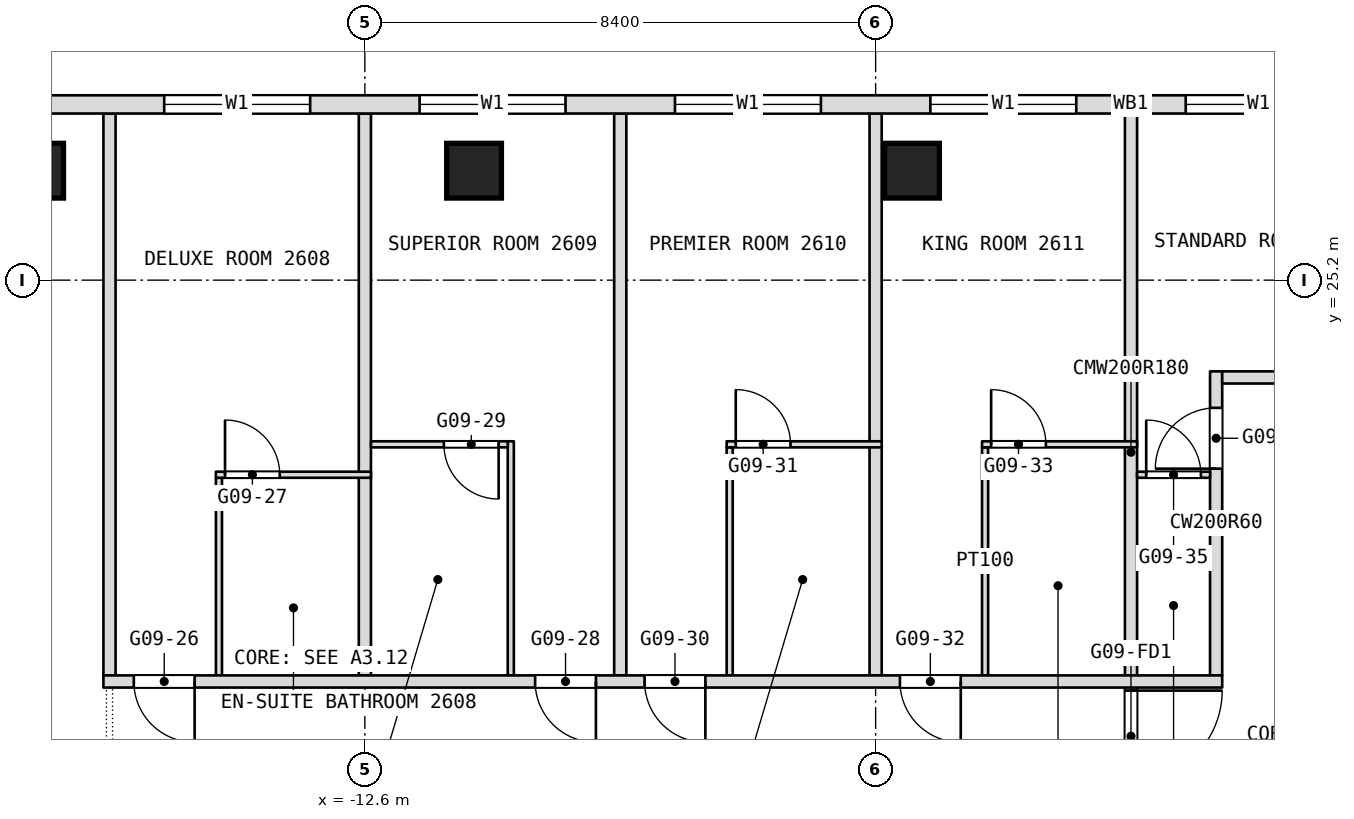
"""IFC4 building model, lengths in metres.
Left out: names, types, materials, properties, quantities, classifications, styles, units other than length and angle.
Written with IfcOpenShell. Run it as: python <this file> out.ifc"""

import sys

from ifc_helpers import new_model, si_unit, direction, frame, frame_2d, origin, origin_2d, place, context, subcontext, project, spatial, rectangle, extrude, element, fill, save


model = new_model("IFC4")
c1 = context("Model", 3, precision=1e-05, world=origin(), true_north=direction((0.0, 1.0)))
c2 = subcontext(c1, "Body", "Model", "MODEL_VIEW")
j1 = project(units=[si_unit("LENGTHUNIT", "METRE"), si_unit("PLANEANGLEUNIT", "RADIAN")], contexts=[c1])
p1 = place(None, origin())
s1 = spatial("IfcSite", under=j1, at=p1, CompositionType="ELEMENT")
p2 = place(p1, origin())
s2 = spatial("IfcBuilding", under=s1, at=p2, CompositionType="ELEMENT")
p3 = place(p2, frame((0.0, 0.0, 119.3)))
s3 = spatial("IfcBuildingStorey", under=s2, at=p3, CompositionType="ELEMENT", Elevation=119.3)
for number, where, z_axis, x_axis in (
    (1, (-18.007, 27.0, 0.0), (0.0, 0.0, 1.0), (1.0, 0.0, 0.0)),
    (2, (-10.804, 27.0, 0.0), (0.0, 0.0, 1.0), (1.0, 0.0, 0.0)),
    (3, (-3.601, 27.0, 0.0), (0.0, 0.0, 1.0), (1.0, 0.0, 0.0)),
):
    element("IfcColumn", number, at=place(p3, frame(where, z_axis=z_axis, x_axis=x_axis)), inside=s3, PredefinedType="COLUMN", context=c2, shape_type="SweptSolid", body=[
        extrude(rectangle(XDim=0.9, YDim=0.9, at=origin_2d()), origin(), (0.0, 0.0, 1.0), 3.6),
    ])
p4 = place(p3, frame((1.4, 18.7, 0.0), z_axis=(0.0, 0.0, 1.0), x_axis=(0.0, 1.0, 0.0)))
e4 = element("IfcWall", 4, at=p4, inside=s3, PredefinedType="PARTITIONING", context=c2, shape_type="SweptSolid", body=[
    extrude(rectangle(XDim=5.0, YDim=0.2, at=frame_2d((2.5, 0.0))), origin(), (0.0, 0.0, 1.0), 3.34),
])
p5 = place(p4, frame((3.4, 0.0, 0.0)))
e5 = element("IfcOpeningElement", 5, at=p5, cuts=e4, PredefinedType="OPENING", context=c2, shape_type="SweptSolid", body=[
    extrude(rectangle(XDim=1.0, YDim=2.1, at=frame_2d((0.5, 1.05))), frame((0.0, 0.1, 0.0), z_axis=(0.0, -1.0, 0.0), x_axis=(1.0, 0.0, 0.0)), (0.0, 0.0, 1.0), 0.2),
])
p6 = place(p3, frame((0.0, 16.8, 0.0), z_axis=(0.0, 0.0, 1.0), x_axis=(0.0, 1.0, 0.0)))
e6 = element("IfcWall", 6, at=p6, inside=s3, PredefinedType="PARTITIONING", context=c2, shape_type="SweptSolid", body=[
    extrude(rectangle(XDim=11.14, YDim=0.2, at=frame_2d((5.57, 0.0))), origin(), (0.0, 0.0, 1.0), 3.34),
])
p7 = place(p6, frame((0.15, 0.0, 0.0)))
e7 = element("IfcOpeningElement", 7, at=p7, cuts=e6, PredefinedType="OPENING", context=c2, shape_type="SweptSolid", body=[
    extrude(rectangle(XDim=1.5, YDim=2.1, at=frame_2d((0.75, 1.05))), frame((0.0, 0.1, 0.0), z_axis=(0.0, -1.0, 0.0), x_axis=(1.0, 0.0, 0.0)), (0.0, 0.0, 1.0), 0.2),
])
p8 = place(p3, frame((-2.4, 18.7, 0.0), z_axis=(0.0, 0.0, 1.0), x_axis=(0.0, 1.0, 0.0)))
e8 = element("IfcWall", 8, at=p8, inside=s3, PredefinedType="PARTITIONING", context=c2, shape_type="SweptSolid", body=[
    extrude(rectangle(XDim=3.75, YDim=0.1, at=frame_2d((1.875, 0.0))), origin(), (0.0, 0.0, 1.0), 3.34),
])
p9 = place(p3, frame((-4.2, 18.7, 0.0), z_axis=(0.0, 0.0, 1.0), x_axis=(0.0, 1.0, 0.0)))
e9 = element("IfcWall", 9, at=p9, inside=s3, PredefinedType="PARTITIONING", context=c2, shape_type="SweptSolid", body=[
    extrude(rectangle(XDim=9.24, YDim=0.2, at=frame_2d((4.62, 0.0))), origin(), (0.0, 0.0, 1.0), 3.34),
])
p10 = place(p3, frame((-6.6, 18.7, 0.0), z_axis=(0.0, 0.0, 1.0), x_axis=(0.0, 1.0, 0.0)))
e10 = element("IfcWall", 10, at=p10, inside=s3, PredefinedType="PARTITIONING", context=c2, shape_type="SweptSolid", body=[
    extrude(rectangle(XDim=3.75, YDim=0.1, at=frame_2d((1.875, 0.0))), origin(), (0.0, 0.0, 1.0), 3.34),
])
p11 = place(p3, frame((-8.4, 18.7, 0.0), z_axis=(0.0, 0.0, 1.0), x_axis=(0.0, 1.0, 0.0)))
e11 = element("IfcWall", 11, at=p11, inside=s3, PredefinedType="PARTITIONING", context=c2, shape_type="SweptSolid", body=[
    extrude(rectangle(XDim=9.24, YDim=0.2, at=frame_2d((4.62, 0.0))), origin(), (0.0, 0.0, 1.0), 3.34),
])
p12 = place(p3, frame((-10.2, 18.7, 0.0), z_axis=(0.0, 0.0, 1.0), x_axis=(0.0, 1.0, 0.0)))
e12 = element("IfcWall", 12, at=p12, inside=s3, PredefinedType="PARTITIONING", context=c2, shape_type="SweptSolid", body=[
    extrude(rectangle(XDim=3.85, YDim=0.1, at=frame_2d((1.925, 0.0))), origin(), (0.0, 0.0, 1.0), 3.34),
])
p13 = place(p3, frame((-12.6, 18.7, 0.0), z_axis=(0.0, 0.0, 1.0), x_axis=(0.0, 1.0, 0.0)))
e13 = element("IfcWall", 13, at=p13, inside=s3, PredefinedType="PARTITIONING", context=c2, shape_type="SweptSolid", body=[
    extrude(rectangle(XDim=9.24, YDim=0.2, at=frame_2d((4.62, 0.0))), origin(), (0.0, 0.0, 1.0), 3.34),
])
p14 = place(p3, frame((-15.0, 18.7, 0.0), z_axis=(0.0, 0.0, 1.0), x_axis=(0.0, 1.0, 0.0)))
e14 = element("IfcWall", 14, at=p14, inside=s3, PredefinedType="PARTITIONING", context=c2, shape_type="SweptSolid", body=[
    extrude(rectangle(XDim=3.25, YDim=0.1, at=frame_2d((1.625, 0.0))), origin(), (0.0, 0.0, 1.0), 3.34),
])
p15 = place(p3, frame((-16.8, 18.7, 0.0), z_axis=(0.0, 0.0, 1.0), x_axis=(0.0, 1.0, 0.0)))
e15 = element("IfcWall", 15, at=p15, inside=s3, PredefinedType="PARTITIONING", context=c2, shape_type="SweptSolid", body=[
    extrude(rectangle(XDim=9.24, YDim=0.2, at=frame_2d((4.62, 0.0))), origin(), (0.0, 0.0, 1.0), 3.34),
])
p16 = place(p3, frame((-16.9, 18.6, 0.0), z_axis=(0.0, 0.0, 1.0), x_axis=(1.0, 0.0, 0.0)))
e16 = element("IfcWall", 16, at=p16, inside=s3, PredefinedType="PARTITIONING", context=c2, shape_type="SweptSolid", body=[
    extrude(rectangle(XDim=18.4, YDim=0.2, at=frame_2d((9.2, 0.0))), origin(), (0.0, 0.0, 1.0), 3.34),
])
p17 = place(p16, frame((0.5, 0.0, 0.0)))
e17 = element("IfcOpeningElement", 17, at=p17, cuts=e16, PredefinedType="OPENING", context=c2, shape_type="SweptSolid", body=[
    extrude(rectangle(XDim=1.0, YDim=2.1, at=frame_2d((0.5, 1.05))), frame((0.0, 0.1, 0.0), z_axis=(0.0, -1.0, 0.0), x_axis=(1.0, 0.0, 0.0)), (0.0, 0.0, 1.0), 0.2),
])
p18 = place(p16, frame((7.1, 0.0, 0.0)))
e18 = element("IfcOpeningElement", 18, at=p18, cuts=e16, PredefinedType="OPENING", context=c2, shape_type="SweptSolid", body=[
    extrude(rectangle(XDim=1.0, YDim=2.1, at=frame_2d((0.5, 1.05))), frame((0.0, 0.1, 0.0), z_axis=(0.0, -1.0, 0.0), x_axis=(1.0, 0.0, 0.0)), (0.0, 0.0, 1.0), 0.2),
])
p19 = place(p16, frame((8.9, 0.0, 0.0)))
e19 = element("IfcOpeningElement", 19, at=p19, cuts=e16, PredefinedType="OPENING", context=c2, shape_type="SweptSolid", body=[
    extrude(rectangle(XDim=1.0, YDim=2.1, at=frame_2d((0.5, 1.05))), frame((0.0, 0.1, 0.0), z_axis=(0.0, -1.0, 0.0), x_axis=(1.0, 0.0, 0.0)), (0.0, 0.0, 1.0), 0.2),
])
p20 = place(p16, frame((13.1, 0.0, 0.0)))
e20 = element("IfcOpeningElement", 20, at=p20, cuts=e16, PredefinedType="OPENING", context=c2, shape_type="SweptSolid", body=[
    extrude(rectangle(XDim=1.0, YDim=2.1, at=frame_2d((0.5, 1.05))), frame((0.0, 0.1, 0.0), z_axis=(0.0, -1.0, 0.0), x_axis=(1.0, 0.0, 0.0)), (0.0, 0.0, 1.0), 0.2),
])
p21 = place(p3, frame((-15.05, 22.0, 0.0), z_axis=(0.0, 0.0, 1.0), x_axis=(1.0, 0.0, 0.0)))
e21 = element("IfcWall", 21, at=p21, inside=s3, PredefinedType="PARTITIONING", context=c2, shape_type="SweptSolid", body=[
    extrude(rectangle(XDim=2.55, YDim=0.1, at=frame_2d((1.275, 0.0))), origin(), (0.0, 0.0, 1.0), 3.34),
])
p22 = place(p21, frame((0.15, 0.0, 0.0)))
e22 = element("IfcOpeningElement", 22, at=p22, cuts=e21, PredefinedType="OPENING", context=c2, shape_type="SweptSolid", body=[
    extrude(rectangle(XDim=0.9, YDim=2.1, at=frame_2d((0.45, 1.05))), frame((0.0, 0.05, 0.0), z_axis=(0.0, -1.0, 0.0), x_axis=(1.0, 0.0, 0.0)), (0.0, 0.0, 1.0), 0.1),
])
p23 = place(p3, frame((0.1, 22.0, 0.0), z_axis=(0.0, 0.0, 1.0), x_axis=(1.0, 0.0, 0.0)))
e23 = element("IfcWall", 23, at=p23, inside=s3, PredefinedType="PARTITIONING", context=c2, shape_type="SweptSolid", body=[
    extrude(rectangle(XDim=1.2, YDim=0.1, at=frame_2d((0.6, 0.0))), origin(), (0.0, 0.0, 1.0), 3.34),
])
p24 = place(p23, frame((0.15, 0.0, 0.0)))
e24 = element("IfcOpeningElement", 24, at=p24, cuts=e23, PredefinedType="OPENING", context=c2, shape_type="SweptSolid", body=[
    extrude(rectangle(XDim=0.9, YDim=2.1, at=frame_2d((0.45, 1.05))), frame((0.0, 0.05, 0.0), z_axis=(0.0, -1.0, 0.0), x_axis=(1.0, 0.0, 0.0)), (0.0, 0.0, 1.0), 0.1),
])
p25 = place(p3, frame((-12.5, 22.5, 0.0), z_axis=(0.0, 0.0, 1.0), x_axis=(1.0, 0.0, 0.0)))
e25 = element("IfcWall", 25, at=p25, inside=s3, PredefinedType="PARTITIONING", context=c2, shape_type="SweptSolid", body=[
    extrude(rectangle(XDim=2.25, YDim=0.1, at=frame_2d((1.125, 0.0))), origin(), (0.0, 0.0, 1.0), 3.34),
])
p26 = place(p25, frame((1.2, 0.0, 0.0)))
e26 = element("IfcOpeningElement", 26, at=p26, cuts=e25, PredefinedType="OPENING", context=c2, shape_type="SweptSolid", body=[
    extrude(rectangle(XDim=0.9, YDim=2.1, at=frame_2d((0.45, 1.05))), frame((0.0, 0.05, 0.0), z_axis=(0.0, -1.0, 0.0), x_axis=(1.0, 0.0, 0.0)), (0.0, 0.0, 1.0), 0.1),
])
p27 = place(p3, frame((-6.65, 22.5, 0.0), z_axis=(0.0, 0.0, 1.0), x_axis=(1.0, 0.0, 0.0)))
e27 = element("IfcWall", 27, at=p27, inside=s3, PredefinedType="PARTITIONING", context=c2, shape_type="SweptSolid", body=[
    extrude(rectangle(XDim=2.55, YDim=0.1, at=frame_2d((1.275, 0.0))), origin(), (0.0, 0.0, 1.0), 3.34),
])
p28 = place(p27, frame((0.15, 0.0, 0.0)))
e28 = element("IfcOpeningElement", 28, at=p28, cuts=e27, PredefinedType="OPENING", context=c2, shape_type="SweptSolid", body=[
    extrude(rectangle(XDim=0.9, YDim=2.1, at=frame_2d((0.45, 1.05))), frame((0.0, 0.05, 0.0), z_axis=(0.0, -1.0, 0.0), x_axis=(1.0, 0.0, 0.0)), (0.0, 0.0, 1.0), 0.1),
])
p29 = place(p3, frame((-2.45, 22.5, 0.0), z_axis=(0.0, 0.0, 1.0), x_axis=(1.0, 0.0, 0.0)))
e29 = element("IfcWall", 29, at=p29, inside=s3, PredefinedType="PARTITIONING", context=c2, shape_type="SweptSolid", body=[
    extrude(rectangle(XDim=2.55, YDim=0.1, at=frame_2d((1.275, 0.0))), origin(), (0.0, 0.0, 1.0), 3.34),
])
p30 = place(p29, frame((0.15, 0.0, 0.0)))
e30 = element("IfcOpeningElement", 30, at=p30, cuts=e29, PredefinedType="OPENING", context=c2, shape_type="SweptSolid", body=[
    extrude(rectangle(XDim=0.9, YDim=2.1, at=frame_2d((0.45, 1.05))), frame((0.0, 0.05, 0.0), z_axis=(0.0, -1.0, 0.0), x_axis=(1.0, 0.0, 0.0)), (0.0, 0.0, 1.0), 0.1),
])
p31 = place(p3, frame((1.5, 23.6, 0.0), z_axis=(0.0, 0.0, 1.0), x_axis=(1.0, 0.0, 0.0)))
e31 = element("IfcWall", 31, at=p31, inside=s3, PredefinedType="PARTITIONING", context=c2, shape_type="SweptSolid", body=[
    extrude(rectangle(XDim=9.2, YDim=0.2, at=frame_2d((4.6, 0.0))), origin(), (0.0, 0.0, 1.0), 3.34),
])
p32 = place(p31, frame((4.3, 0.0, 0.0)))
e32 = element("IfcOpeningElement", 32, at=p32, cuts=e31, PredefinedType="OPENING", context=c2, shape_type="SweptSolid", body=[
    extrude(rectangle(XDim=1.0, YDim=2.1, at=frame_2d((0.5, 1.05))), frame((0.0, 0.1, 0.0), z_axis=(0.0, -1.0, 0.0), x_axis=(1.0, 0.0, 0.0)), (0.0, 0.0, 1.0), 0.2),
])
p33 = place(p3, frame((21.306, 28.09, 0.0), z_axis=(0.0, 0.0, 1.0), x_axis=(-1.0, 0.0, 0.0)))
e33 = element("IfcWall", 33, at=p33, inside=s3, PredefinedType="NOTDEFINED", context=c2, shape_type="SweptSolid", body=[
    extrude(rectangle(XDim=42.612, YDim=0.3, at=frame_2d((21.306, 0.0))), origin(), (0.0, 0.0, 1.0), 3.6),
])
p34 = place(p33, frame((5.406, 0.0, 0.9)))
e34 = element("IfcOpeningElement", 34, at=p34, cuts=e33, PredefinedType="OPENING", context=c2, shape_type="SweptSolid", body=[
    extrude(rectangle(XDim=2.4, YDim=2.1, at=frame_2d((1.2, 1.05))), frame((0.0, 0.15, 0.0), z_axis=(0.0, -1.0, 0.0), x_axis=(1.0, 0.0, 0.0)), (0.0, 0.0, 1.0), 0.3),
])
p35 = place(p33, frame((9.606, 0.0, 0.9)))
e35 = element("IfcOpeningElement", 35, at=p35, cuts=e33, PredefinedType="OPENING", context=c2, shape_type="SweptSolid", body=[
    extrude(rectangle(XDim=2.4, YDim=2.1, at=frame_2d((1.2, 1.05))), frame((0.0, 0.15, 0.0), z_axis=(0.0, -1.0, 0.0), x_axis=(1.0, 0.0, 0.0)), (0.0, 0.0, 1.0), 0.3),
])
p36 = place(p33, frame((13.806, 0.0, 0.9)))
e36 = element("IfcOpeningElement", 36, at=p36, cuts=e33, PredefinedType="OPENING", context=c2, shape_type="SweptSolid", body=[
    extrude(rectangle(XDim=2.4, YDim=2.1, at=frame_2d((1.2, 1.05))), frame((0.0, 0.15, 0.0), z_axis=(0.0, -1.0, 0.0), x_axis=(1.0, 0.0, 0.0)), (0.0, 0.0, 1.0), 0.3),
])
p37 = place(p33, frame((18.006, 0.0, 0.9)))
e37 = element("IfcOpeningElement", 37, at=p37, cuts=e33, PredefinedType="OPENING", context=c2, shape_type="SweptSolid", body=[
    extrude(rectangle(XDim=2.4, YDim=2.1, at=frame_2d((1.2, 1.05))), frame((0.0, 0.15, 0.0), z_axis=(0.0, -1.0, 0.0), x_axis=(1.0, 0.0, 0.0)), (0.0, 0.0, 1.0), 0.3),
])
p38 = place(p33, frame((22.206, 0.0, 0.9)))
e38 = element("IfcOpeningElement", 38, at=p38, cuts=e33, PredefinedType="OPENING", context=c2, shape_type="SweptSolid", body=[
    extrude(rectangle(XDim=2.4, YDim=2.1, at=frame_2d((1.2, 1.05))), frame((0.0, 0.15, 0.0), z_axis=(0.0, -1.0, 0.0), x_axis=(1.0, 0.0, 0.0)), (0.0, 0.0, 1.0), 0.3),
])
p39 = place(p33, frame((26.406, 0.0, 0.9)))
e39 = element("IfcOpeningElement", 39, at=p39, cuts=e33, PredefinedType="OPENING", context=c2, shape_type="SweptSolid", body=[
    extrude(rectangle(XDim=2.4, YDim=2.1, at=frame_2d((1.2, 1.05))), frame((0.0, 0.15, 0.0), z_axis=(0.0, -1.0, 0.0), x_axis=(1.0, 0.0, 0.0)), (0.0, 0.0, 1.0), 0.3),
])
p40 = place(p33, frame((30.606, 0.0, 0.9)))
e40 = element("IfcOpeningElement", 40, at=p40, cuts=e33, PredefinedType="OPENING", context=c2, shape_type="SweptSolid", body=[
    extrude(rectangle(XDim=2.4, YDim=2.1, at=frame_2d((1.2, 1.05))), frame((0.0, 0.15, 0.0), z_axis=(0.0, -1.0, 0.0), x_axis=(1.0, 0.0, 0.0)), (0.0, 0.0, 1.0), 0.3),
])
p41 = place(p33, frame((34.806, 0.0, 0.9)))
e41 = element("IfcOpeningElement", 41, at=p41, cuts=e33, PredefinedType="OPENING", context=c2, shape_type="SweptSolid", body=[
    extrude(rectangle(XDim=2.4, YDim=2.1, at=frame_2d((1.2, 1.05))), frame((0.0, 0.15, 0.0), z_axis=(0.0, -1.0, 0.0), x_axis=(1.0, 0.0, 0.0)), (0.0, 0.0, 1.0), 0.3),
])
p42 = place(p5, origin())
e42 = element("IfcDoor", 42, at=p42, inside=s3, OperationType="SINGLE_SWING_RIGHT", PredefinedType="DOOR", context=c2, shape_type="SweptSolid", body=[
    extrude(rectangle(XDim=1.0, YDim=2.1, at=frame_2d((0.5, 1.05))), frame((0.0, 0.025, 0.0), z_axis=(0.0, -1.0, 0.0), x_axis=(1.0, 0.0, 0.0)), (0.0, 0.0, 1.0), 0.05),
])
fill(e5, e42)
p43 = place(p17, origin())
e43 = element("IfcDoor", 43, at=p43, inside=s3, OperationType="SINGLE_SWING_LEFT", PredefinedType="DOOR", context=c2, shape_type="SweptSolid", body=[
    extrude(rectangle(XDim=1.0, YDim=2.1, at=frame_2d((0.5, 1.05))), frame((0.0, 0.025, 0.0), z_axis=(0.0, -1.0, 0.0), x_axis=(1.0, 0.0, 0.0)), (0.0, 0.0, 1.0), 0.05),
])
fill(e17, e43)
p44 = place(p18, origin())
e44 = element("IfcDoor", 44, at=p44, inside=s3, OperationType="SINGLE_SWING_LEFT", PredefinedType="DOOR", context=c2, shape_type="SweptSolid", body=[
    extrude(rectangle(XDim=1.0, YDim=2.1, at=frame_2d((0.5, 1.05))), frame((0.0, 0.025, 0.0), z_axis=(0.0, -1.0, 0.0), x_axis=(1.0, 0.0, 0.0)), (0.0, 0.0, 1.0), 0.05),
])
fill(e18, e44)
p45 = place(p19, origin())
e45 = element("IfcDoor", 45, at=p45, inside=s3, OperationType="SINGLE_SWING_LEFT", PredefinedType="DOOR", context=c2, shape_type="SweptSolid", body=[
    extrude(rectangle(XDim=1.0, YDim=2.1, at=frame_2d((0.5, 1.05))), frame((0.0, 0.025, 0.0), z_axis=(0.0, -1.0, 0.0), x_axis=(1.0, 0.0, 0.0)), (0.0, 0.0, 1.0), 0.05),
])
fill(e19, e45)
p46 = place(p20, origin())
e46 = element("IfcDoor", 46, at=p46, inside=s3, OperationType="SINGLE_SWING_LEFT", PredefinedType="DOOR", context=c2, shape_type="SweptSolid", body=[
    extrude(rectangle(XDim=1.0, YDim=2.1, at=frame_2d((0.5, 1.05))), frame((0.0, 0.025, 0.0), z_axis=(0.0, -1.0, 0.0), x_axis=(1.0, 0.0, 0.0)), (0.0, 0.0, 1.0), 0.05),
])
fill(e20, e46)
p47 = place(p22, origin())
e47 = element("IfcDoor", 47, at=p47, inside=s3, OperationType="SINGLE_SWING_RIGHT", PredefinedType="DOOR", context=c2, shape_type="SweptSolid", body=[
    extrude(rectangle(XDim=0.9, YDim=2.1, at=frame_2d((0.45, 1.05))), frame((0.0, 0.025, 0.0), z_axis=(0.0, -1.0, 0.0), x_axis=(1.0, 0.0, 0.0)), (0.0, 0.0, 1.0), 0.05),
])
fill(e22, e47)
p48 = place(p24, origin())
e48 = element("IfcDoor", 48, at=p48, inside=s3, OperationType="SINGLE_SWING_LEFT", PredefinedType="DOOR", context=c2, shape_type="SweptSolid", body=[
    extrude(rectangle(XDim=0.9, YDim=2.1, at=frame_2d((0.45, 1.05))), frame((0.0, 0.025, 0.0), z_axis=(0.0, -1.0, 0.0), x_axis=(1.0, 0.0, 0.0)), (0.0, 0.0, 1.0), 0.05),
])
fill(e24, e48)
p49 = place(p26, origin())
e49 = element("IfcDoor", 49, at=p49, inside=s3, OperationType="SINGLE_SWING_LEFT", PredefinedType="DOOR", context=c2, shape_type="SweptSolid", body=[
    extrude(rectangle(XDim=0.9, YDim=2.1, at=frame_2d((0.45, 1.05))), frame((0.0, 0.025, 0.0), z_axis=(0.0, -1.0, 0.0), x_axis=(1.0, 0.0, 0.0)), (0.0, 0.0, 1.0), 0.05),
])
fill(e26, e49)
p50 = place(p28, origin())
e50 = element("IfcDoor", 50, at=p50, inside=s3, OperationType="SINGLE_SWING_RIGHT", PredefinedType="DOOR", context=c2, shape_type="SweptSolid", body=[
    extrude(rectangle(XDim=0.9, YDim=2.1, at=frame_2d((0.45, 1.05))), frame((0.0, 0.025, 0.0), z_axis=(0.0, -1.0, 0.0), x_axis=(1.0, 0.0, 0.0)), (0.0, 0.0, 1.0), 0.05),
])
fill(e28, e50)
p51 = place(p30, origin())
e51 = element("IfcDoor", 51, at=p51, inside=s3, OperationType="SINGLE_SWING_RIGHT", PredefinedType="DOOR", context=c2, shape_type="SweptSolid", body=[
    extrude(rectangle(XDim=0.9, YDim=2.1, at=frame_2d((0.45, 1.05))), frame((0.0, 0.025, 0.0), z_axis=(0.0, -1.0, 0.0), x_axis=(1.0, 0.0, 0.0)), (0.0, 0.0, 1.0), 0.05),
])
fill(e30, e51)
p52 = place(p37, origin())
e52 = element("IfcWindow", 52, at=p52, inside=s3, PartitioningType="SINGLE_PANEL", PredefinedType="WINDOW", context=c2, shape_type="SweptSolid", body=[
    extrude(rectangle(XDim=2.4, YDim=2.1, at=frame_2d((1.2, 1.05))), frame((0.0, 0.03, 0.0), z_axis=(0.0, -1.0, 0.0), x_axis=(1.0, 0.0, 0.0)), (0.0, 0.0, 1.0), 0.06),
])
fill(e37, e52)
p53 = place(p38, origin())
e53 = element("IfcWindow", 53, at=p53, inside=s3, PartitioningType="SINGLE_PANEL", PredefinedType="WINDOW", context=c2, shape_type="SweptSolid", body=[
    extrude(rectangle(XDim=2.4, YDim=2.1, at=frame_2d((1.2, 1.05))), frame((0.0, 0.03, 0.0), z_axis=(0.0, -1.0, 0.0), x_axis=(1.0, 0.0, 0.0)), (0.0, 0.0, 1.0), 0.06),
])
fill(e38, e53)
p54 = place(p39, origin())
e54 = element("IfcWindow", 54, at=p54, inside=s3, PartitioningType="SINGLE_PANEL", PredefinedType="WINDOW", context=c2, shape_type="SweptSolid", body=[
    extrude(rectangle(XDim=2.4, YDim=2.1, at=frame_2d((1.2, 1.05))), frame((0.0, 0.03, 0.0), z_axis=(0.0, -1.0, 0.0), x_axis=(1.0, 0.0, 0.0)), (0.0, 0.0, 1.0), 0.06),
])
fill(e39, e54)
p55 = place(p40, origin())
e55 = element("IfcWindow", 55, at=p55, inside=s3, PartitioningType="SINGLE_PANEL", PredefinedType="WINDOW", context=c2, shape_type="SweptSolid", body=[
    extrude(rectangle(XDim=2.4, YDim=2.1, at=frame_2d((1.2, 1.05))), frame((0.0, 0.03, 0.0), z_axis=(0.0, -1.0, 0.0), x_axis=(1.0, 0.0, 0.0)), (0.0, 0.0, 1.0), 0.06),
])
fill(e40, e55)
p56 = place(p41, origin())
e56 = element("IfcWindow", 56, at=p56, inside=s3, PartitioningType="SINGLE_PANEL", PredefinedType="WINDOW", context=c2, shape_type="SweptSolid", body=[
    extrude(rectangle(XDim=2.4, YDim=2.1, at=frame_2d((1.2, 1.05))), frame((0.0, 0.03, 0.0), z_axis=(0.0, -1.0, 0.0), x_axis=(1.0, 0.0, 0.0)), (0.0, 0.0, 1.0), 0.06),
])
fill(e41, e56)
p57 = place(p7, origin())
e57 = element("IfcDoor", 57, at=p57, inside=s3, OperationType="DOUBLE_DOOR_DOUBLE_SWING", PredefinedType="DOOR", context=c2, shape_type="SweptSolid", body=[
    extrude(rectangle(XDim=1.5, YDim=2.1, at=frame_2d((0.75, 1.05))), frame((0.0, 0.025, 0.0), z_axis=(0.0, -1.0, 0.0), x_axis=(1.0, 0.0, 0.0)), (0.0, 0.0, 1.0), 0.05),
])
fill(e7, e57)
save(model, sys.argv[1])
